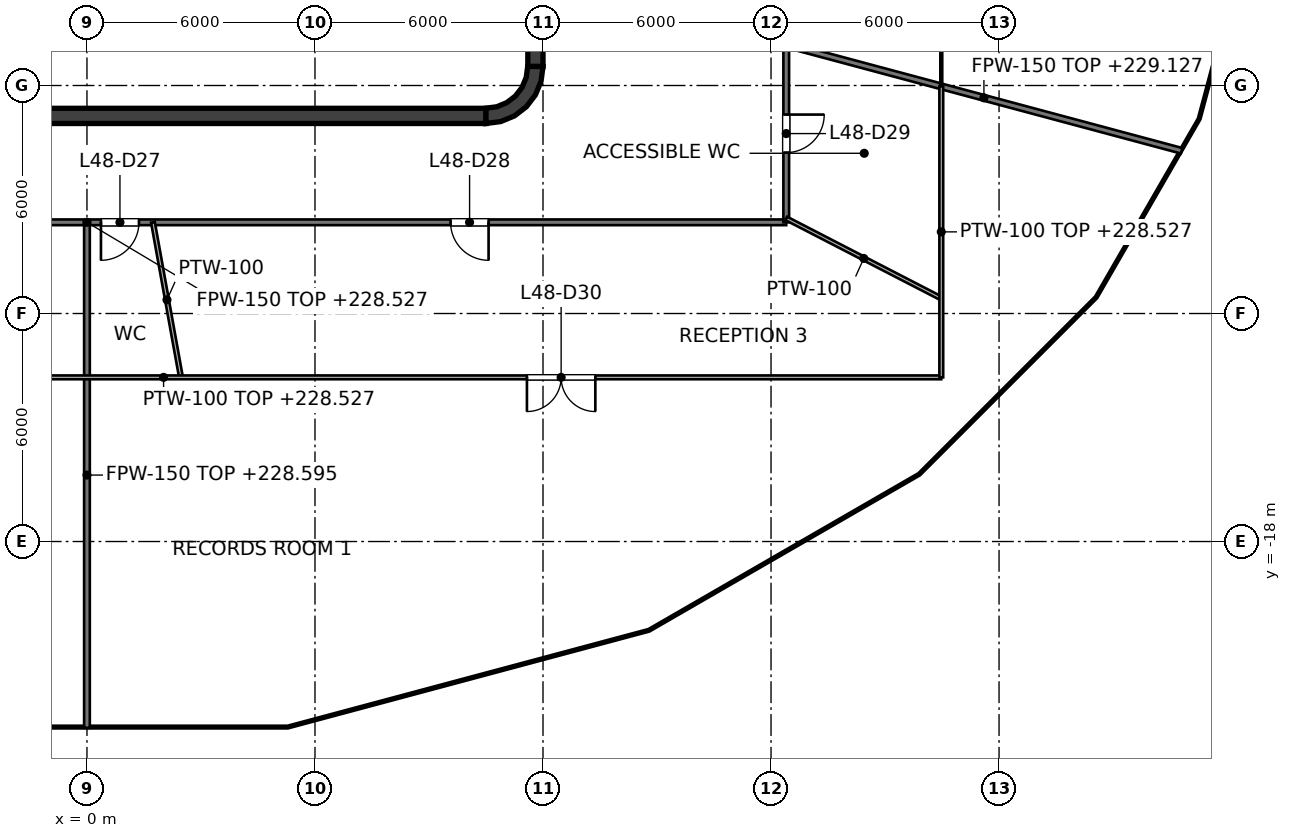
"""IFC4 building model, lengths in metres.
Left out: names, types, materials, properties, quantities, classifications, styles, units other than length and angle.
Written with IfcOpenShell. Run it as: python <this file> out.ifc"""

import sys

from ifc_helpers import new_model, si_unit, direction, frame, frame_2d, origin, place, context, subcontext, project, spatial, polyline, rectangle, outline, extrude, element, fill, save


model = new_model("IFC4")
c1 = context("Model", 3, precision=1e-05, world=origin(), true_north=direction((0.0, 1.0)))
c2 = subcontext(c1, "Body", "Model", "MODEL_VIEW")
j1 = project(units=[si_unit("LENGTHUNIT", "METRE"), si_unit("PLANEANGLEUNIT", "RADIAN")], contexts=[c1])
p1 = place(None, origin())
s1 = spatial("IfcSite", under=j1, at=p1, CompositionType="ELEMENT")
p2 = place(p1, origin())
s2 = spatial("IfcBuilding", under=s1, at=p2, CompositionType="ELEMENT")
p3 = place(p2, frame((0.0, 0.0, 225.6)))
s3 = spatial("IfcBuildingStorey", under=s2, at=p3, CompositionType="ELEMENT", Elevation=225.6)
p4 = place(p3, frame((-10.5, -6.8, 0.0), z_axis=(0.0, 0.0, 1.0), x_axis=(1.0, 0.0, 0.0)))
e1 = element("IfcWall", 1, at=p4, inside=s3, PredefinedType="SHEAR", context=c2, shape_type="SweptSolid", body=[
    extrude(rectangle(XDim=21.0, YDim=0.4, at=frame_2d((10.5, 0.0))), origin(), (0.0, 0.0, 1.0), 4.0),
])
p5 = place(p3, frame((11.8, -5.5, 0.0), z_axis=(0.0, 0.0, 1.0), x_axis=(0.0, 1.0, 0.0)))
e2 = element("IfcWall", 2, at=p5, inside=s3, PredefinedType="SHEAR", context=c2, shape_type="SweptSolid", body=[
    extrude(rectangle(XDim=11.0, YDim=0.4, at=frame_2d((5.5, 0.0))), origin(), (0.0, 0.0, 1.0), 4.0),
])
p6 = place(p5, frame((3.9, 0.0, 0.0)))
e3 = element("IfcOpeningElement", 3, at=p6, cuts=e2, PredefinedType="OPENING", context=c2, shape_type="SweptSolid", body=[
    extrude(rectangle(XDim=1.0, YDim=2.1, at=frame_2d((0.5, 1.05))), frame((0.0, 0.2, 0.0), z_axis=(0.0, -1.0, 0.0), x_axis=(1.0, 0.0, 0.0)), (0.0, 0.0, 1.0), 0.4),
])
p7 = place(p5, frame((6.8, 0.0, 0.0)))
e4 = element("IfcOpeningElement", 4, at=p7, cuts=e2, PredefinedType="OPENING", context=c2, shape_type="SweptSolid", body=[
    extrude(rectangle(XDim=1.0, YDim=2.1, at=frame_2d((0.5, 1.05))), frame((0.0, 0.2, 0.0), z_axis=(0.0, -1.0, 0.0), x_axis=(1.0, 0.0, 0.0)), (0.0, 0.0, 1.0), 0.4),
])
p8 = place(p5, frame((0.9, 0.0, 0.0)))
e5 = element("IfcOpeningElement", 5, at=p8, cuts=e2, PredefinedType="OPENING", context=c2, shape_type="SweptSolid", body=[
    extrude(rectangle(XDim=1.2, YDim=2.1, at=frame_2d((0.6, 1.05))), frame((0.0, 0.2, 0.0), z_axis=(0.0, -1.0, 0.0), x_axis=(1.0, 0.0, 0.0)), (0.0, 0.0, 1.0), 0.4),
])
p9 = place(p5, frame((8.9, 0.0, 0.0)))
e6 = element("IfcOpeningElement", 6, at=p9, cuts=e2, PredefinedType="OPENING", context=c2, shape_type="SweptSolid", body=[
    extrude(rectangle(XDim=1.2, YDim=2.1, at=frame_2d((0.6, 1.05))), frame((0.0, 0.2, 0.0), z_axis=(0.0, -1.0, 0.0), x_axis=(1.0, 0.0, 0.0)), (0.0, 0.0, 1.0), 0.4),
])
p10 = place(p3, origin())
e7 = element("IfcWall", 7, at=p10, inside=s3, PredefinedType="SHEAR", context=c2, shape_type="SweptSolid", body=[
    extrude(outline(polyline([(12.0, -5.5), (11.596, -5.5), (11.559, -5.784), (11.45, -6.048), (11.275, -6.275), (11.048, -6.45), (10.784, -6.559), (10.5, -6.596), (10.5, -7.0), (10.888, -6.949), (11.25, -6.799), (11.561, -6.561), (11.799, -6.25), (11.949, -5.888), (12.0, -5.5)])), origin(), (0.0, 0.0, 1.0), 4.0),
])
p11 = place(p3, frame((0.3, -6.6, 0.0), z_axis=(0.0, 0.0, 1.0), x_axis=(0.0, 1.0, 0.0)))
e8 = element("IfcWall", 8, at=p11, inside=s3, PredefinedType="PARTITIONING", context=c2, shape_type="SweptSolid", body=[
    extrude(rectangle(XDim=2.5, YDim=0.15, at=frame_2d((1.25, 0.0))), origin(), (0.0, 0.0, 1.0), 3.85),
])
p12 = place(p11, frame((0.8, 0.0, 0.0)))
e9 = element("IfcOpeningElement", 9, at=p12, cuts=e8, PredefinedType="OPENING", context=c2, shape_type="SweptSolid", body=[
    extrude(rectangle(XDim=0.9, YDim=2.1, at=frame_2d((0.45, 1.05))), frame((0.0, 0.075, 0.0), z_axis=(0.0, -1.0, 0.0), x_axis=(1.0, 0.0, 0.0)), (0.0, 0.0, 1.0), 0.15),
])
p13 = place(p3, frame((9.0, -6.6, 0.0), z_axis=(0.0, 0.0, 1.0), x_axis=(0.0, 1.0, 0.0)))
e10 = element("IfcWall", 10, at=p13, inside=s3, PredefinedType="SOLIDWALL", context=c2, shape_type="SweptSolid", body=[
    extrude(rectangle(XDim=2.5, YDim=0.25, at=frame_2d((1.25, 0.0))), origin(), (0.0, 0.0, 1.0), 3.85),
])
p14 = place(p13, frame((0.65, 0.0, 0.0)))
e11 = element("IfcOpeningElement", 11, at=p14, cuts=e10, PredefinedType="OPENING", context=c2, shape_type="SweptSolid", body=[
    extrude(rectangle(XDim=1.2, YDim=2.1, at=frame_2d((0.6, 1.05))), frame((0.0, 0.125, 0.0), z_axis=(0.0, -1.0, 0.0), x_axis=(1.0, 0.0, 0.0)), (0.0, 0.0, 1.0), 0.25),
])
p15 = place(p3, frame((3.15, -6.6, 0.0), z_axis=(0.0, 0.0, 1.0), x_axis=(0.0, 1.0, 0.0)))
e12 = element("IfcWall", 12, at=p15, inside=s3, PredefinedType="SOLIDWALL", context=c2, shape_type="SweptSolid", body=[
    extrude(rectangle(XDim=2.5, YDim=0.25, at=frame_2d((1.25, 0.0))), origin(), (0.0, 0.0, 1.0), 3.85),
])
p16 = place(p3, frame((18.4, -4.93, 0.0), z_axis=(0.0, 0.0, 1.0), x_axis=(0.965918203443, -0.258847492275, 0.0)))
e13 = element("IfcWall", 13, at=p16, inside=s3, PredefinedType="PARTITIONING", context=c2, shape_type="SweptSolid", body=[
    extrude(rectangle(XDim=10.771, YDim=0.15, at=frame_2d((5.386, 0.0))), origin(), (0.0, 0.0, 1.0), 3.527),
])
p17 = place(p3, frame((-18.4, -9.6, 0.0), z_axis=(0.0, 0.0, 1.0), x_axis=(1.0, 0.0, 0.0)))
e14 = element("IfcWall", 14, at=p17, inside=s3, PredefinedType="PARTITIONING", context=c2, shape_type="SweptSolid", body=[
    extrude(rectangle(XDim=36.8, YDim=0.15, at=frame_2d((18.4, 0.0))), origin(), (0.0, 0.0, 1.0), 2.927),
])
p18 = place(p17, frame((5.082, 0.0, 0.0)))
e15 = element("IfcOpeningElement", 15, at=p18, cuts=e14, PredefinedType="OPENING", context=c2, shape_type="SweptSolid", body=[
    extrude(rectangle(XDim=1.0, YDim=2.1, at=frame_2d((0.5, 1.05))), frame((0.0, 0.075, 0.0), z_axis=(0.0, -1.0, 0.0), x_axis=(1.0, 0.0, 0.0)), (0.0, 0.0, 1.0), 0.15),
])
p19 = place(p17, frame((11.135, 0.0, 0.0)))
e16 = element("IfcOpeningElement", 16, at=p19, cuts=e14, PredefinedType="OPENING", context=c2, shape_type="SweptSolid", body=[
    extrude(rectangle(XDim=1.0, YDim=2.1, at=frame_2d((0.5, 1.05))), frame((0.0, 0.075, 0.0), z_axis=(0.0, -1.0, 0.0), x_axis=(1.0, 0.0, 0.0)), (0.0, 0.0, 1.0), 0.15),
])
p20 = place(p17, frame((15.588, 0.0, 0.0)))
e17 = element("IfcOpeningElement", 17, at=p20, cuts=e14, PredefinedType="OPENING", context=c2, shape_type="SweptSolid", body=[
    extrude(rectangle(XDim=1.0, YDim=2.1, at=frame_2d((0.5, 1.05))), frame((0.0, 0.075, 0.0), z_axis=(0.0, -1.0, 0.0), x_axis=(1.0, 0.0, 0.0)), (0.0, 0.0, 1.0), 0.15),
])
p21 = place(p17, frame((18.768, 0.0, 0.0)))
e18 = element("IfcOpeningElement", 18, at=p21, cuts=e14, PredefinedType="OPENING", context=c2, shape_type="SweptSolid", body=[
    extrude(rectangle(XDim=1.0, YDim=2.1, at=frame_2d((0.5, 1.05))), frame((0.0, 0.075, 0.0), z_axis=(0.0, -1.0, 0.0), x_axis=(1.0, 0.0, 0.0)), (0.0, 0.0, 1.0), 0.15),
])
p22 = place(p17, frame((27.968, 0.0, 0.0)))
e19 = element("IfcOpeningElement", 19, at=p22, cuts=e14, PredefinedType="OPENING", context=c2, shape_type="SweptSolid", body=[
    extrude(rectangle(XDim=1.0, YDim=2.1, at=frame_2d((0.5, 1.05))), frame((0.0, 0.075, 0.0), z_axis=(0.0, -1.0, 0.0), x_axis=(1.0, 0.0, 0.0)), (0.0, 0.0, 1.0), 0.15),
])
p23 = place(p3, frame((18.4, -9.6, 0.0), z_axis=(0.0, 0.0, 1.0), x_axis=(0.0, 1.0, 0.0)))
e20 = element("IfcWall", 20, at=p23, inside=s3, PredefinedType="PARTITIONING", context=c2, shape_type="SweptSolid", body=[
    extrude(rectangle(XDim=19.2, YDim=0.15, at=frame_2d((9.6, 0.0))), origin(), (0.0, 0.0, 1.0), 2.918),
])
p24 = place(p23, frame((1.835, 0.0, 0.0)))
e21 = element("IfcOpeningElement", 21, at=p24, cuts=e20, PredefinedType="OPENING", context=c2, shape_type="SweptSolid", body=[
    extrude(rectangle(XDim=1.0, YDim=2.1, at=frame_2d((0.5, 1.05))), frame((0.0, 0.075, 0.0), z_axis=(0.0, -1.0, 0.0), x_axis=(1.0, 0.0, 0.0)), (0.0, 0.0, 1.0), 0.15),
])
p25 = place(p23, frame((6.584, 0.0, 0.0)))
e22 = element("IfcOpeningElement", 22, at=p25, cuts=e20, PredefinedType="OPENING", context=c2, shape_type="SweptSolid", body=[
    extrude(rectangle(XDim=1.0, YDim=2.1, at=frame_2d((0.5, 1.05))), frame((0.0, 0.075, 0.0), z_axis=(0.0, -1.0, 0.0), x_axis=(1.0, 0.0, 0.0)), (0.0, 0.0, 1.0), 0.15),
])
p26 = place(p23, frame((11.514, 0.0, 0.0)))
e23 = element("IfcOpeningElement", 23, at=p26, cuts=e20, PredefinedType="OPENING", context=c2, shape_type="SweptSolid", body=[
    extrude(rectangle(XDim=1.0, YDim=2.1, at=frame_2d((0.5, 1.05))), frame((0.0, 0.075, 0.0), z_axis=(0.0, -1.0, 0.0), x_axis=(1.0, 0.0, 0.0)), (0.0, 0.0, 1.0), 0.15),
])
p27 = place(p23, frame((16.365, 0.0, 0.0)))
e24 = element("IfcOpeningElement", 24, at=p27, cuts=e20, PredefinedType="OPENING", context=c2, shape_type="SweptSolid", body=[
    extrude(rectangle(XDim=1.0, YDim=2.1, at=frame_2d((0.5, 1.05))), frame((0.0, 0.075, 0.0), z_axis=(0.0, -1.0, 0.0), x_axis=(1.0, 0.0, 0.0)), (0.0, 0.0, 1.0), 0.15),
])
p28 = place(p3, frame((0.0, -22.903, 0.0), z_axis=(0.0, 0.0, 1.0), x_axis=(0.0, 1.0, 0.0)))
e25 = element("IfcWall", 25, at=p28, inside=s3, PredefinedType="PARTITIONING", context=c2, shape_type="SweptSolid", body=[
    extrude(rectangle(XDim=13.303, YDim=0.15, at=frame_2d((6.651, 0.0))), origin(), (0.0, 0.0, 1.0), 2.995),
])
p29 = place(p3, frame((22.48, -6.023, 0.0), z_axis=(0.0, 0.0, 1.0), x_axis=(0.0, 1.0, 0.0)))
e26 = element("IfcWall", 26, at=p29, inside=s3, PredefinedType="PARTITIONING", context=c2, shape_type="SweptSolid", body=[
    extrude(rectangle(XDim=19.002, YDim=0.05, at=frame_2d((9.501, 0.0))), origin(), (0.0, 0.0, 1.0), 2.918),
])
p30 = place(p29, frame((2.511, 0.0, 0.0)))
e27 = element("IfcOpeningElement", 27, at=p30, cuts=e26, PredefinedType="OPENING", context=c2, shape_type="SweptSolid", body=[
    extrude(rectangle(XDim=1.0, YDim=2.1, at=frame_2d((0.5, 1.05))), frame((0.0, 0.025, 0.0), z_axis=(0.0, -1.0, 0.0), x_axis=(1.0, 0.0, 0.0)), (0.0, 0.0, 1.0), 0.05),
])
p31 = place(p29, frame((8.534, 0.0, 0.0)))
e28 = element("IfcOpeningElement", 28, at=p31, cuts=e26, PredefinedType="OPENING", context=c2, shape_type="SweptSolid", body=[
    extrude(rectangle(XDim=1.0, YDim=2.1, at=frame_2d((0.5, 1.05))), frame((0.0, 0.025, 0.0), z_axis=(0.0, -1.0, 0.0), x_axis=(1.0, 0.0, 0.0)), (0.0, 0.0, 1.0), 0.05),
])
p32 = place(p29, frame((14.974, 0.0, 0.0)))
e29 = element("IfcOpeningElement", 29, at=p32, cuts=e26, PredefinedType="OPENING", context=c2, shape_type="SweptSolid", body=[
    extrude(rectangle(XDim=1.0, YDim=2.1, at=frame_2d((0.5, 1.05))), frame((0.0, 0.025, 0.0), z_axis=(0.0, -1.0, 0.0), x_axis=(1.0, 0.0, 0.0)), (0.0, 0.0, 1.0), 0.05),
])
p33 = place(p3, frame((1.736, -9.6, 0.0), z_axis=(0.0, 0.0, 1.0), x_axis=(0.178009628273, -0.984028745638, 0.0)))
e30 = element("IfcWall", 30, at=p33, inside=s3, PredefinedType="PARTITIONING", context=c2, shape_type="SweptSolid", body=[
    extrude(rectangle(XDim=4.146, YDim=0.1, at=frame_2d((2.073, 0.0))), origin(), (0.0, 0.0, 1.0), 3.85),
])
p34 = place(p3, frame((18.4, -9.497, 0.0), z_axis=(0.0, 0.0, 1.0), x_axis=(0.888610870054, -0.458661881587, 0.0)))
e31 = element("IfcWall", 31, at=p34, inside=s3, PredefinedType="PARTITIONING", context=c2, shape_type="SweptSolid", body=[
    extrude(rectangle(XDim=4.592, YDim=0.1, at=frame_2d((2.296, 0.0))), origin(), (0.0, 0.0, 1.0), 3.85),
])
p35 = place(p3, frame((-18.448, -13.68, 0.0), z_axis=(0.0, 0.0, 1.0), x_axis=(1.0, 0.0, 0.0)))
e32 = element("IfcWall", 32, at=p35, inside=s3, PredefinedType="PARTITIONING", context=c2, shape_type="SweptSolid", body=[
    extrude(rectangle(XDim=40.928, YDim=0.1, at=frame_2d((20.464, 0.0))), origin(), (0.0, 0.0, 1.0), 2.927),
])
p36 = place(p35, frame((14.203, 0.0, 0.0)))
e33 = element("IfcOpeningElement", 33, at=p36, cuts=e32, PredefinedType="OPENING", context=c2, shape_type="SweptSolid", body=[
    extrude(rectangle(XDim=1.8, YDim=2.1, at=frame_2d((0.9, 1.05))), frame((0.0, 0.05, 0.0), z_axis=(0.0, -1.0, 0.0), x_axis=(1.0, 0.0, 0.0)), (0.0, 0.0, 1.0), 0.1),
])
p37 = place(p35, frame((30.025, 0.0, 0.0)))
e34 = element("IfcOpeningElement", 34, at=p37, cuts=e32, PredefinedType="OPENING", context=c2, shape_type="SweptSolid", body=[
    extrude(rectangle(XDim=1.8, YDim=2.1, at=frame_2d((0.9, 1.05))), frame((0.0, 0.05, 0.0), z_axis=(0.0, -1.0, 0.0), x_axis=(1.0, 0.0, 0.0)), (0.0, 0.0, 1.0), 0.1),
])
p38 = place(p3, frame((22.48, -13.68, 0.0), z_axis=(0.0, 0.0, 1.0), x_axis=(0.0, 1.0, 0.0)))
e35 = element("IfcWall", 35, at=p38, inside=s3, PredefinedType="PARTITIONING", context=c2, shape_type="SweptSolid", body=[
    extrude(rectangle(XDim=7.657, YDim=0.1, at=frame_2d((3.829, 0.0))), origin(), (0.0, 0.0, 1.0), 2.927),
])
p39 = place(p14, origin())
e36 = element("IfcDoor", 36, at=p39, inside=s3, OperationType="SINGLE_SWING_LEFT", PredefinedType="DOOR", context=c2, shape_type="SweptSolid", body=[
    extrude(rectangle(XDim=1.2, YDim=2.1, at=frame_2d((0.6, 1.05))), frame((0.0, 0.025, 0.0), z_axis=(0.0, -1.0, 0.0), x_axis=(1.0, 0.0, 0.0)), (0.0, 0.0, 1.0), 0.05),
])
fill(e11, e36)
p40 = place(p12, origin())
e37 = element("IfcDoor", 37, at=p40, inside=s3, OperationType="SINGLE_SWING_RIGHT", PredefinedType="DOOR", context=c2, shape_type="SweptSolid", body=[
    extrude(rectangle(XDim=0.9, YDim=2.1, at=frame_2d((0.45, 1.05))), frame((0.0, 0.025, 0.0), z_axis=(0.0, -1.0, 0.0), x_axis=(1.0, 0.0, 0.0)), (0.0, 0.0, 1.0), 0.05),
])
fill(e9, e37)
p41 = place(p21, origin())
e38 = element("IfcDoor", 38, at=p41, inside=s3, OperationType="SINGLE_SWING_LEFT", PredefinedType="DOOR", context=c2, shape_type="SweptSolid", body=[
    extrude(rectangle(XDim=1.0, YDim=2.1, at=frame_2d((0.5, 1.05))), frame((0.0, 0.025, 0.0), z_axis=(0.0, -1.0, 0.0), x_axis=(1.0, 0.0, 0.0)), (0.0, 0.0, 1.0), 0.05),
])
fill(e18, e38)
p42 = place(p22, origin())
e39 = element("IfcDoor", 39, at=p42, inside=s3, OperationType="SINGLE_SWING_RIGHT", PredefinedType="DOOR", context=c2, shape_type="SweptSolid", body=[
    extrude(rectangle(XDim=1.0, YDim=2.1, at=frame_2d((0.5, 1.05))), frame((0.0, 0.025, 0.0), z_axis=(0.0, -1.0, 0.0), x_axis=(1.0, 0.0, 0.0)), (0.0, 0.0, 1.0), 0.05),
])
fill(e19, e39)
p43 = place(p24, origin())
e40 = element("IfcDoor", 40, at=p43, inside=s3, OperationType="SINGLE_SWING_RIGHT", PredefinedType="DOOR", context=c2, shape_type="SweptSolid", body=[
    extrude(rectangle(XDim=1.0, YDim=2.1, at=frame_2d((0.5, 1.05))), frame((0.0, 0.025, 0.0), z_axis=(0.0, -1.0, 0.0), x_axis=(1.0, 0.0, 0.0)), (0.0, 0.0, 1.0), 0.05),
])
fill(e21, e40)
p44 = place(p37, origin())
e41 = element("IfcDoor", 41, at=p44, inside=s3, OperationType="DOUBLE_DOOR_SINGLE_SWING", PredefinedType="DOOR", context=c2, shape_type="SweptSolid", body=[
    extrude(rectangle(XDim=1.8, YDim=2.1, at=frame_2d((0.9, 1.05))), frame((0.0, 0.025, 0.0), z_axis=(0.0, -1.0, 0.0), x_axis=(1.0, 0.0, 0.0)), (0.0, 0.0, 1.0), 0.05),
])
fill(e34, e41)
save(model, sys.argv[1])
